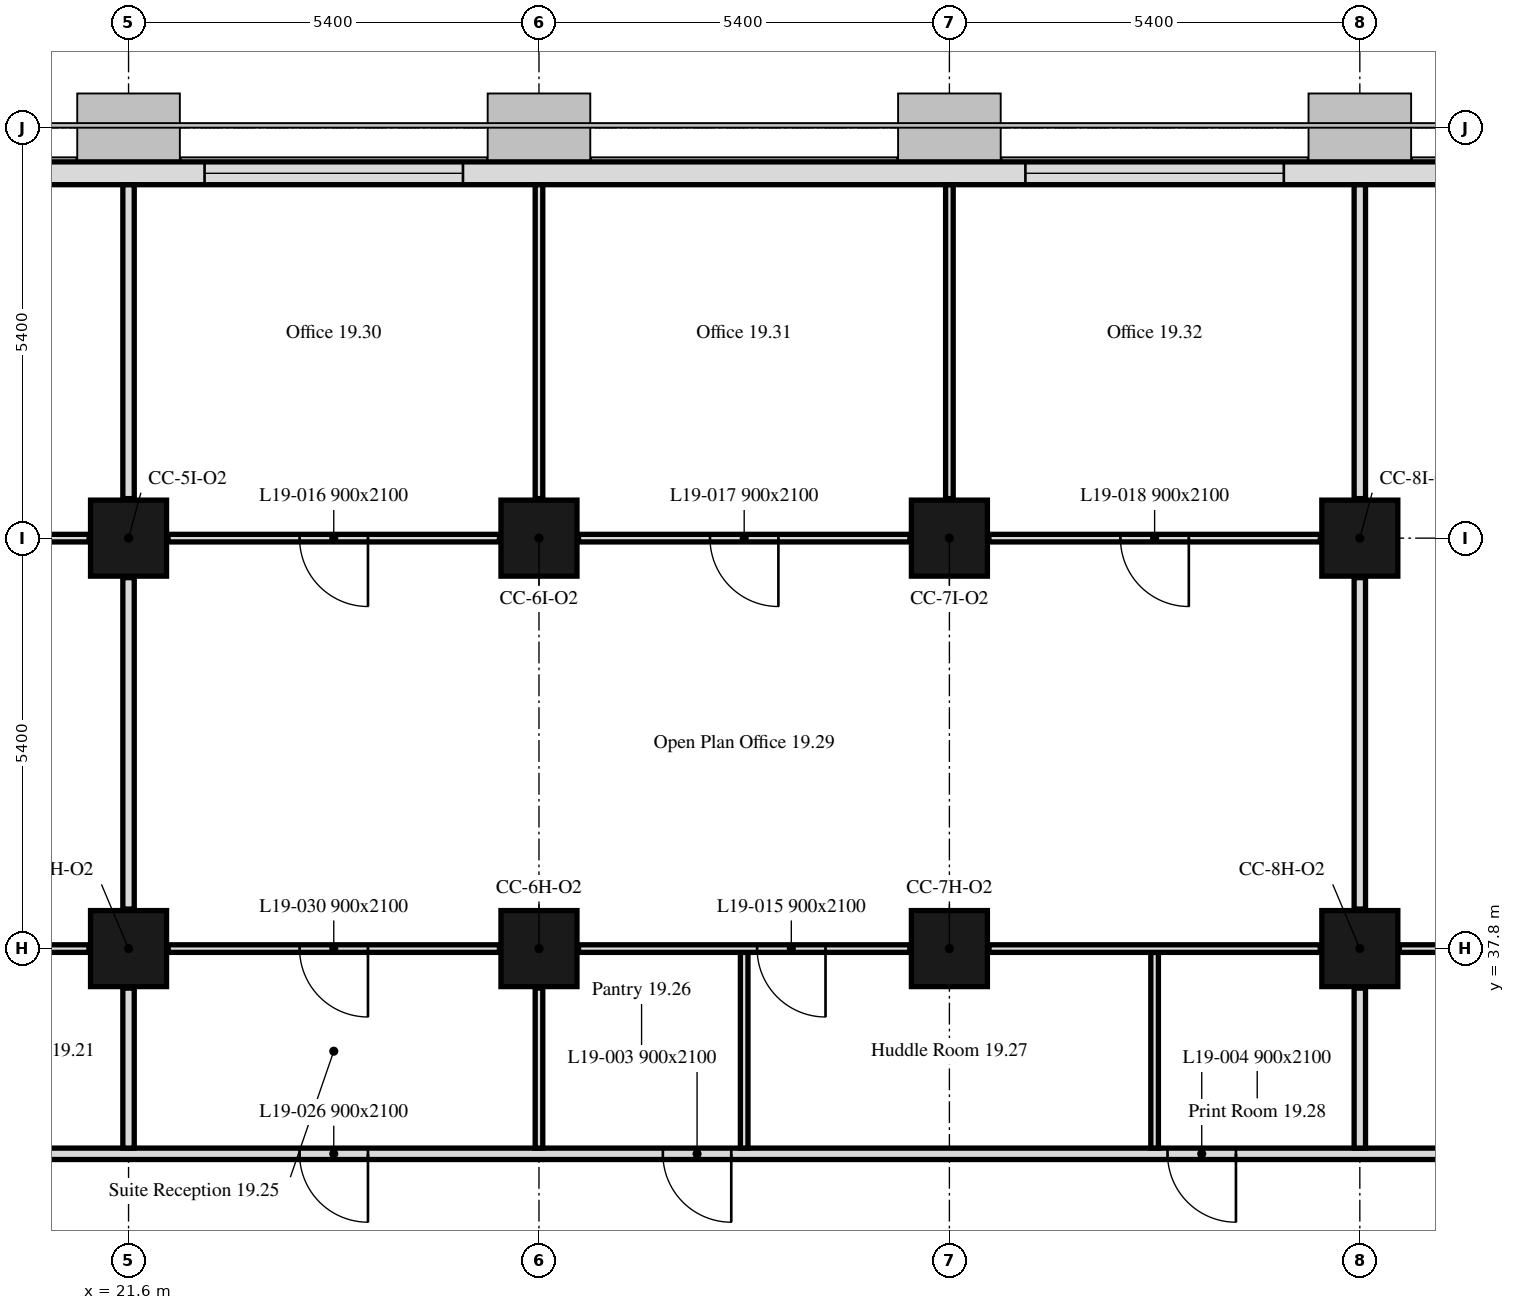
"""IFC4 building model, lengths in metres.
Left out: names, types, materials, properties, quantities, classifications, styles, units other than length and angle.
Written with IfcOpenShell. Run it as: python <this file> out.ifc"""

import sys

from ifc_helpers import new_model, si_unit, direction, frame, frame_2d, origin, origin_2d, place, context, subcontext, project, spatial, rectangle, extrude, element, fill, save


model = new_model("IFC4")
c1 = context("Model", 3, precision=1e-05, world=origin(), true_north=direction((0.0, 1.0)))
c2 = subcontext(c1, "Body", "Model", "MODEL_VIEW")
j1 = project(units=[si_unit("LENGTHUNIT", "METRE"), si_unit("PLANEANGLEUNIT", "RADIAN")], contexts=[c1])
p1 = place(None, origin())
s1 = spatial("IfcSite", under=j1, at=p1, CompositionType="ELEMENT")
p2 = place(p1, origin())
s2 = spatial("IfcBuilding", under=s1, at=p2, CompositionType="ELEMENT")
p3 = place(p2, frame((0.0, 0.0, 84.0)))
s3 = spatial("IfcBuildingStorey", under=s2, at=p3, CompositionType="ELEMENT", Elevation=84.0)
for number, where, z_axis, x_axis in (
    (1, (21.6, 37.8, 0.0), (0.0, 0.0, 1.0), (1.0, 0.0, 0.0)),
    (2, (27.0, 37.8, 0.0), (0.0, 0.0, 1.0), (1.0, 0.0, 0.0)),
    (3, (32.4, 37.8, 0.0), (0.0, 0.0, 1.0), (1.0, 0.0, 0.0)),
    (4, (37.8, 37.8, 0.0), (0.0, 0.0, 1.0), (1.0, 0.0, 0.0)),
    (5, (21.6, 43.2, 0.0), (0.0, 0.0, 1.0), (1.0, 0.0, 0.0)),
    (6, (27.0, 43.2, 0.0), (0.0, 0.0, 1.0), (1.0, 0.0, 0.0)),
    (7, (32.4, 43.2, 0.0), (0.0, 0.0, 1.0), (1.0, 0.0, 0.0)),
    (8, (37.8, 43.2, 0.0), (0.0, 0.0, 1.0), (1.0, 0.0, 0.0)),
):
    element("IfcColumn", number, at=place(p3, frame(where, z_axis=z_axis, x_axis=x_axis)), inside=s3, PredefinedType="COLUMN", context=c2, shape_type="SweptSolid", body=[
        extrude(rectangle(XDim=1.0, YDim=1.0, at=origin_2d()), origin(), (0.0, 0.0, 1.0), 3.5),
    ])
p4 = place(p3, frame((43.014, 48.0, 0.0), z_axis=(0.0, 0.0, 1.0), x_axis=(-1.0, 0.0, 0.0)))
e9 = element("IfcWall", 9, at=p4, inside=s3, PredefinedType="SOLIDWALL", context=c2, shape_type="SweptSolid", body=[
    extrude(rectangle(XDim=32.027, YDim=0.3, at=frame_2d((16.014, 0.0))), origin(), (0.0, 0.0, 1.0), 3.5),
])
p5 = place(p4, frame((6.214, 0.0, 0.9)))
e10 = element("IfcOpeningElement", 10, at=p5, cuts=e9, PredefinedType="OPENING", context=c2, shape_type="SweptSolid", body=[
    extrude(rectangle(XDim=3.4, YDim=1.7, at=frame_2d((1.7, 0.85))), frame((0.0, 0.16, 0.0), z_axis=(0.0, -1.0, 0.0), x_axis=(1.0, 0.0, 0.0)), (0.0, 0.0, 1.0), 0.32),
])
p6 = place(p4, frame((17.014, 0.0, 0.9)))
e11 = element("IfcOpeningElement", 11, at=p6, cuts=e9, PredefinedType="OPENING", context=c2, shape_type="SweptSolid", body=[
    extrude(rectangle(XDim=3.4, YDim=1.7, at=frame_2d((1.7, 0.85))), frame((0.0, 0.16, 0.0), z_axis=(0.0, -1.0, 0.0), x_axis=(1.0, 0.0, 0.0)), (0.0, 0.0, 1.0), 0.32),
])
p7 = place(p4, frame((27.814, 0.0, 0.9)))
e12 = element("IfcOpeningElement", 12, at=p7, cuts=e9, PredefinedType="OPENING", context=c2, shape_type="SweptSolid", body=[
    extrude(rectangle(XDim=3.4, YDim=1.7, at=frame_2d((1.7, 0.85))), frame((0.0, 0.16, 0.0), z_axis=(0.0, -1.0, 0.0), x_axis=(1.0, 0.0, 0.0)), (0.0, 0.0, 1.0), 0.32),
])
p8 = place(p3, frame((47.849, 35.1, 0.0), z_axis=(0.0, 0.0, 1.0), x_axis=(-1.0, 0.0, 0.0)))
e13 = element("IfcWall", 13, at=p8, inside=s3, PredefinedType="PARTITIONING", context=c2, shape_type="SweptSolid", body=[
    extrude(rectangle(XDim=41.698, YDim=0.15, at=frame_2d((20.849, 0.0))), origin(), (0.0, 0.0, 1.0), 2.75),
])
p9 = place(p8, frame((29.119, 0.0, 0.0)))
e14 = element("IfcOpeningElement", 14, at=p9, cuts=e13, PredefinedType="OPENING", context=c2, shape_type="SweptSolid", body=[
    extrude(rectangle(XDim=0.9, YDim=2.1, at=frame_2d((0.45, 1.05))), frame((0.0, 0.075, 0.0), z_axis=(0.0, -1.0, 0.0), x_axis=(1.0, 0.0, 0.0)), (0.0, 0.0, 1.0), 0.15),
])
p10 = place(p8, frame((27.879, 0.0, 0.0)))
e15 = element("IfcOpeningElement", 15, at=p10, cuts=e13, PredefinedType="OPENING", context=c2, shape_type="SweptSolid", body=[
    extrude(rectangle(XDim=0.9, YDim=2.1, at=frame_2d((0.45, 1.05))), frame((0.0, 0.075, 0.0), z_axis=(0.0, -1.0, 0.0), x_axis=(1.0, 0.0, 0.0)), (0.0, 0.0, 1.0), 0.15),
])
p11 = place(p8, frame((18.319, 0.0, 0.0)))
e16 = element("IfcOpeningElement", 16, at=p11, cuts=e13, PredefinedType="OPENING", context=c2, shape_type="SweptSolid", body=[
    extrude(rectangle(XDim=0.9, YDim=2.1, at=frame_2d((0.45, 1.05))), frame((0.0, 0.075, 0.0), z_axis=(0.0, -1.0, 0.0), x_axis=(1.0, 0.0, 0.0)), (0.0, 0.0, 1.0), 0.15),
])
p12 = place(p8, frame((11.679, 0.0, 0.0)))
e17 = element("IfcOpeningElement", 17, at=p12, cuts=e13, PredefinedType="OPENING", context=c2, shape_type="SweptSolid", body=[
    extrude(rectangle(XDim=0.9, YDim=2.1, at=frame_2d((0.45, 1.05))), frame((0.0, 0.075, 0.0), z_axis=(0.0, -1.0, 0.0), x_axis=(1.0, 0.0, 0.0)), (0.0, 0.0, 1.0), 0.15),
])
p13 = place(p8, frame((38.624, 0.0, 0.0)))
e18 = element("IfcOpeningElement", 18, at=p13, cuts=e13, PredefinedType="OPENING", context=c2, shape_type="SweptSolid", body=[
    extrude(rectangle(XDim=0.9, YDim=2.1, at=frame_2d((0.45, 1.05))), frame((0.0, 0.075, 0.0), z_axis=(0.0, -1.0, 0.0), x_axis=(1.0, 0.0, 0.0)), (0.0, 0.0, 1.0), 0.15),
])
p14 = place(p8, frame((23.099, 0.0, 0.0)))
e19 = element("IfcOpeningElement", 19, at=p14, cuts=e13, PredefinedType="OPENING", context=c2, shape_type="SweptSolid", body=[
    extrude(rectangle(XDim=0.9, YDim=2.1, at=frame_2d((0.45, 1.05))), frame((0.0, 0.075, 0.0), z_axis=(0.0, -1.0, 0.0), x_axis=(1.0, 0.0, 0.0)), (0.0, 0.0, 1.0), 0.15),
])
p15 = place(p8, frame((6.899, 0.0, 0.0)))
e20 = element("IfcOpeningElement", 20, at=p15, cuts=e13, PredefinedType="OPENING", context=c2, shape_type="SweptSolid", body=[
    extrude(rectangle(XDim=0.9, YDim=2.1, at=frame_2d((0.45, 1.05))), frame((0.0, 0.075, 0.0), z_axis=(0.0, -1.0, 0.0), x_axis=(1.0, 0.0, 0.0)), (0.0, 0.0, 1.0), 0.15),
])
p16 = place(p3, frame((21.6, 35.175, 0.0), z_axis=(0.0, 0.0, 1.0), x_axis=(0.0, 1.0, 0.0)))
e21 = element("IfcWall", 21, at=p16, inside=s3, PredefinedType="PARTITIONING", context=c2, shape_type="SweptSolid", body=[
    extrude(rectangle(XDim=2.105, YDim=0.15, at=frame_2d((1.052, 0.0))), origin(), (0.0, 0.0, 1.0), 2.75),
])
p17 = place(p3, frame((21.08, 37.8, 0.0), z_axis=(0.0, 0.0, 1.0), x_axis=(-1.0, 0.0, 0.0)))
e22 = element("IfcWall", 22, at=p17, inside=s3, PredefinedType="PARTITIONING", context=c2, shape_type="SweptSolid", body=[
    extrude(rectangle(XDim=4.36, YDim=0.1, at=frame_2d((2.18, 0.0))), origin(), (0.0, 0.0, 1.0), 3.5),
])
p18 = place(p3, frame((21.08, 43.2, 0.0), z_axis=(0.0, 0.0, 1.0), x_axis=(-1.0, 0.0, 0.0)))
e23 = element("IfcWall", 23, at=p18, inside=s3, PredefinedType="PARTITIONING", context=c2, shape_type="SweptSolid", body=[
    extrude(rectangle(XDim=4.36, YDim=0.1, at=frame_2d((2.18, 0.0))), origin(), (0.0, 0.0, 1.0), 3.5),
])
p19 = place(p18, frame((1.73, 0.0, 0.0)))
e24 = element("IfcOpeningElement", 24, at=p19, cuts=e23, PredefinedType="OPENING", context=c2, shape_type="SweptSolid", body=[
    extrude(rectangle(XDim=0.9, YDim=2.1, at=frame_2d((0.45, 1.05))), frame((0.0, 0.05, 0.0), z_axis=(0.0, -1.0, 0.0), x_axis=(1.0, 0.0, 0.0)), (0.0, 0.0, 1.0), 0.1),
])
p20 = place(p3, frame((21.6, 38.32, 0.0), z_axis=(0.0, 0.0, 1.0), x_axis=(0.0, 1.0, 0.0)))
e25 = element("IfcWall", 25, at=p20, inside=s3, PredefinedType="PARTITIONING", context=c2, shape_type="SweptSolid", body=[
    extrude(rectangle(XDim=4.36, YDim=0.15, at=frame_2d((2.18, 0.0))), origin(), (0.0, 0.0, 1.0), 2.75),
])
p21 = place(p3, frame((21.6, 43.72, 0.0), z_axis=(0.0, 0.0, 1.0), x_axis=(0.0, 1.0, 0.0)))
e26 = element("IfcWall", 26, at=p21, inside=s3, PredefinedType="PARTITIONING", context=c2, shape_type="SweptSolid", body=[
    extrude(rectangle(XDim=4.129, YDim=0.15, at=frame_2d((2.064, 0.0))), origin(), (0.0, 0.0, 1.0), 2.75),
])
p22 = place(p3, frame((27.0, 35.175, 0.0), z_axis=(0.0, 0.0, 1.0), x_axis=(0.0, 1.0, 0.0)))
e27 = element("IfcWall", 27, at=p22, inside=s3, PredefinedType="PARTITIONING", context=c2, shape_type="SweptSolid", body=[
    extrude(rectangle(XDim=2.105, YDim=0.1, at=frame_2d((1.052, 0.0))), origin(), (0.0, 0.0, 1.0), 2.75),
])
p23 = place(p3, frame((26.48, 37.8, 0.0), z_axis=(0.0, 0.0, 1.0), x_axis=(-1.0, 0.0, 0.0)))
e28 = element("IfcWall", 28, at=p23, inside=s3, PredefinedType="PARTITIONING", context=c2, shape_type="SweptSolid", body=[
    extrude(rectangle(XDim=4.36, YDim=0.1, at=frame_2d((2.18, 0.0))), origin(), (0.0, 0.0, 1.0), 3.5),
])
p24 = place(p23, frame((1.73, 0.0, 0.0)))
e29 = element("IfcOpeningElement", 29, at=p24, cuts=e28, PredefinedType="OPENING", context=c2, shape_type="SweptSolid", body=[
    extrude(rectangle(XDim=0.9, YDim=2.1, at=frame_2d((0.45, 1.05))), frame((0.0, 0.05, 0.0), z_axis=(0.0, -1.0, 0.0), x_axis=(1.0, 0.0, 0.0)), (0.0, 0.0, 1.0), 0.1),
])
for number, where, z_axis, x_axis in (
    (30, (29.7, 35.175, 0.0), (0.0, 0.0, 1.0), (0.0, 1.0, 0.0)),
    (31, (35.1, 35.175, 0.0), (0.0, 0.0, 1.0), (0.0, 1.0, 0.0)),
):
    element("IfcWall", number, at=place(p3, frame(where, z_axis=z_axis, x_axis=x_axis)), inside=s3, PredefinedType="PARTITIONING", context=c2, shape_type="SweptSolid", body=[
        extrude(rectangle(XDim=2.575, YDim=0.1, at=frame_2d((1.288, 0.0))), origin(), (0.0, 0.0, 1.0), 3.5),
    ])
p25 = place(p3, frame((31.88, 37.8, 0.0), z_axis=(0.0, 0.0, 1.0), x_axis=(-1.0, 0.0, 0.0)))
e32 = element("IfcWall", 32, at=p25, inside=s3, PredefinedType="PARTITIONING", context=c2, shape_type="SweptSolid", body=[
    extrude(rectangle(XDim=4.36, YDim=0.1, at=frame_2d((2.18, 0.0))), origin(), (0.0, 0.0, 1.0), 3.5),
])
p26 = place(p25, frame((1.11, 0.0, 0.0)))
e33 = element("IfcOpeningElement", 33, at=p26, cuts=e32, PredefinedType="OPENING", context=c2, shape_type="SweptSolid", body=[
    extrude(rectangle(XDim=0.9, YDim=2.1, at=frame_2d((0.45, 1.05))), frame((0.0, 0.05, 0.0), z_axis=(0.0, -1.0, 0.0), x_axis=(1.0, 0.0, 0.0)), (0.0, 0.0, 1.0), 0.1),
])
p27 = place(p3, frame((37.8, 35.175, 0.0), z_axis=(0.0, 0.0, 1.0), x_axis=(0.0, 1.0, 0.0)))
e34 = element("IfcWall", 34, at=p27, inside=s3, PredefinedType="PARTITIONING", context=c2, shape_type="SweptSolid", body=[
    extrude(rectangle(XDim=2.105, YDim=0.15, at=frame_2d((1.052, 0.0))), origin(), (0.0, 0.0, 1.0), 2.75),
])
p28 = place(p3, frame((37.28, 37.8, 0.0), z_axis=(0.0, 0.0, 1.0), x_axis=(-1.0, 0.0, 0.0)))
e35 = element("IfcWall", 35, at=p28, inside=s3, PredefinedType="PARTITIONING", context=c2, shape_type="SweptSolid", body=[
    extrude(rectangle(XDim=4.36, YDim=0.1, at=frame_2d((2.18, 0.0))), origin(), (0.0, 0.0, 1.0), 2.75),
])
p29 = place(p3, frame((37.8, 38.32, 0.0), z_axis=(0.0, 0.0, 1.0), x_axis=(0.0, 1.0, 0.0)))
e36 = element("IfcWall", 36, at=p29, inside=s3, PredefinedType="PARTITIONING", context=c2, shape_type="SweptSolid", body=[
    extrude(rectangle(XDim=4.36, YDim=0.15, at=frame_2d((2.18, 0.0))), origin(), (0.0, 0.0, 1.0), 2.75),
])
p30 = place(p3, frame((37.28, 43.2, 0.0), z_axis=(0.0, 0.0, 1.0), x_axis=(-1.0, 0.0, 0.0)))
e37 = element("IfcWall", 37, at=p30, inside=s3, PredefinedType="PARTITIONING", context=c2, shape_type="SweptSolid", body=[
    extrude(rectangle(XDim=4.36, YDim=0.1, at=frame_2d((2.18, 0.0))), origin(), (0.0, 0.0, 1.0), 3.5),
])
p31 = place(p30, frame((1.73, 0.0, 0.0)))
e38 = element("IfcOpeningElement", 38, at=p31, cuts=e37, PredefinedType="OPENING", context=c2, shape_type="SweptSolid", body=[
    extrude(rectangle(XDim=0.9, YDim=2.1, at=frame_2d((0.45, 1.05))), frame((0.0, 0.05, 0.0), z_axis=(0.0, -1.0, 0.0), x_axis=(1.0, 0.0, 0.0)), (0.0, 0.0, 1.0), 0.1),
])
p32 = place(p3, frame((31.88, 43.2, 0.0), z_axis=(0.0, 0.0, 1.0), x_axis=(-1.0, 0.0, 0.0)))
e39 = element("IfcWall", 39, at=p32, inside=s3, PredefinedType="PARTITIONING", context=c2, shape_type="SweptSolid", body=[
    extrude(rectangle(XDim=4.36, YDim=0.1, at=frame_2d((2.18, 0.0))), origin(), (0.0, 0.0, 1.0), 3.5),
])
p33 = place(p32, frame((1.73, 0.0, 0.0)))
e40 = element("IfcOpeningElement", 40, at=p33, cuts=e39, PredefinedType="OPENING", context=c2, shape_type="SweptSolid", body=[
    extrude(rectangle(XDim=0.9, YDim=2.1, at=frame_2d((0.45, 1.05))), frame((0.0, 0.05, 0.0), z_axis=(0.0, -1.0, 0.0), x_axis=(1.0, 0.0, 0.0)), (0.0, 0.0, 1.0), 0.1),
])
p34 = place(p3, frame((26.48, 43.2, 0.0), z_axis=(0.0, 0.0, 1.0), x_axis=(-1.0, 0.0, 0.0)))
e41 = element("IfcWall", 41, at=p34, inside=s3, PredefinedType="PARTITIONING", context=c2, shape_type="SweptSolid", body=[
    extrude(rectangle(XDim=4.36, YDim=0.1, at=frame_2d((2.18, 0.0))), origin(), (0.0, 0.0, 1.0), 3.5),
])
p35 = place(p34, frame((1.73, 0.0, 0.0)))
e42 = element("IfcOpeningElement", 42, at=p35, cuts=e41, PredefinedType="OPENING", context=c2, shape_type="SweptSolid", body=[
    extrude(rectangle(XDim=0.9, YDim=2.1, at=frame_2d((0.45, 1.05))), frame((0.0, 0.05, 0.0), z_axis=(0.0, -1.0, 0.0), x_axis=(1.0, 0.0, 0.0)), (0.0, 0.0, 1.0), 0.1),
])
for number, where, z_axis, x_axis in (
    (43, (27.0, 43.72, 0.0), (0.0, 0.0, 1.0), (0.0, 1.0, 0.0)),
    (44, (32.4, 43.72, 0.0), (0.0, 0.0, 1.0), (0.0, 1.0, 0.0)),
):
    element("IfcWall", number, at=place(p3, frame(where, z_axis=z_axis, x_axis=x_axis)), inside=s3, PredefinedType="PARTITIONING", context=c2, shape_type="SweptSolid", body=[
        extrude(rectangle(XDim=4.129, YDim=0.1, at=frame_2d((2.064, 0.0))), origin(), (0.0, 0.0, 1.0), 2.75),
    ])
p36 = place(p3, frame((37.8, 43.72, 0.0), z_axis=(0.0, 0.0, 1.0), x_axis=(0.0, 1.0, 0.0)))
e45 = element("IfcWall", 45, at=p36, inside=s3, PredefinedType="PARTITIONING", context=c2, shape_type="SweptSolid", body=[
    extrude(rectangle(XDim=4.129, YDim=0.15, at=frame_2d((2.064, 0.0))), origin(), (0.0, 0.0, 1.0), 2.75),
])
p37 = place(p3, frame((42.68, 37.8, 0.0), z_axis=(0.0, 0.0, 1.0), x_axis=(-1.0, 0.0, 0.0)))
e46 = element("IfcWall", 46, at=p37, inside=s3, PredefinedType="PARTITIONING", context=c2, shape_type="SweptSolid", body=[
    extrude(rectangle(XDim=4.36, YDim=0.1, at=frame_2d((2.18, 0.0))), origin(), (0.0, 0.0, 1.0), 2.75),
])
p38 = place(p37, frame((1.73, 0.0, 0.0)))
e47 = element("IfcOpeningElement", 47, at=p38, cuts=e46, PredefinedType="OPENING", context=c2, shape_type="SweptSolid", body=[
    extrude(rectangle(XDim=0.9, YDim=2.1, at=frame_2d((0.45, 1.05))), frame((0.0, 0.05, 0.0), z_axis=(0.0, -1.0, 0.0), x_axis=(1.0, 0.0, 0.0)), (0.0, 0.0, 1.0), 0.1),
])
p39 = place(p5, origin())
e48 = element("IfcWindow", 48, at=p39, inside=s3, PartitioningType="SINGLE_PANEL", PredefinedType="WINDOW", context=c2, shape_type="SweptSolid", body=[
    extrude(rectangle(XDim=3.4, YDim=1.7, at=frame_2d((1.7, 0.85))), frame((0.0, 0.03, 0.0), z_axis=(0.0, -1.0, 0.0), x_axis=(1.0, 0.0, 0.0)), (0.0, 0.0, 1.0), 0.06),
])
fill(e10, e48)
p40 = place(p6, origin())
e49 = element("IfcWindow", 49, at=p40, inside=s3, PartitioningType="SINGLE_PANEL", PredefinedType="WINDOW", context=c2, shape_type="SweptSolid", body=[
    extrude(rectangle(XDim=3.4, YDim=1.7, at=frame_2d((1.7, 0.85))), frame((0.0, 0.03, 0.0), z_axis=(0.0, -1.0, 0.0), x_axis=(1.0, 0.0, 0.0)), (0.0, 0.0, 1.0), 0.06),
])
fill(e11, e49)
p41 = place(p11, origin())
e50 = element("IfcDoor", 50, at=p41, inside=s3, OperationType="SINGLE_SWING_RIGHT", PredefinedType="DOOR", context=c2, shape_type="SweptSolid", body=[
    extrude(rectangle(XDim=0.9, YDim=2.1, at=frame_2d((0.45, 1.05))), frame((0.0, 0.025, 0.0), z_axis=(0.0, -1.0, 0.0), x_axis=(1.0, 0.0, 0.0)), (0.0, 0.0, 1.0), 0.05),
])
fill(e16, e50)
p42 = place(p12, origin())
e51 = element("IfcDoor", 51, at=p42, inside=s3, OperationType="SINGLE_SWING_RIGHT", PredefinedType="DOOR", context=c2, shape_type="SweptSolid", body=[
    extrude(rectangle(XDim=0.9, YDim=2.1, at=frame_2d((0.45, 1.05))), frame((0.0, 0.025, 0.0), z_axis=(0.0, -1.0, 0.0), x_axis=(1.0, 0.0, 0.0)), (0.0, 0.0, 1.0), 0.05),
])
fill(e17, e51)
p43 = place(p26, origin())
e52 = element("IfcDoor", 52, at=p43, inside=s3, OperationType="SINGLE_SWING_RIGHT", PredefinedType="DOOR", context=c2, shape_type="SweptSolid", body=[
    extrude(rectangle(XDim=0.9, YDim=2.1, at=frame_2d((0.45, 1.05))), frame((0.0, 0.025, 0.0), z_axis=(0.0, -1.0, 0.0), x_axis=(1.0, 0.0, 0.0)), (0.0, 0.0, 1.0), 0.05),
])
fill(e33, e52)
p44 = place(p35, origin())
e53 = element("IfcDoor", 53, at=p44, inside=s3, OperationType="SINGLE_SWING_RIGHT", PredefinedType="DOOR", context=c2, shape_type="SweptSolid", body=[
    extrude(rectangle(XDim=0.9, YDim=2.1, at=frame_2d((0.45, 1.05))), frame((0.0, 0.025, 0.0), z_axis=(0.0, -1.0, 0.0), x_axis=(1.0, 0.0, 0.0)), (0.0, 0.0, 1.0), 0.05),
])
fill(e42, e53)
p45 = place(p33, origin())
e54 = element("IfcDoor", 54, at=p45, inside=s3, OperationType="SINGLE_SWING_RIGHT", PredefinedType="DOOR", context=c2, shape_type="SweptSolid", body=[
    extrude(rectangle(XDim=0.9, YDim=2.1, at=frame_2d((0.45, 1.05))), frame((0.0, 0.025, 0.0), z_axis=(0.0, -1.0, 0.0), x_axis=(1.0, 0.0, 0.0)), (0.0, 0.0, 1.0), 0.05),
])
fill(e40, e54)
p46 = place(p31, origin())
e55 = element("IfcDoor", 55, at=p46, inside=s3, OperationType="SINGLE_SWING_RIGHT", PredefinedType="DOOR", context=c2, shape_type="SweptSolid", body=[
    extrude(rectangle(XDim=0.9, YDim=2.1, at=frame_2d((0.45, 1.05))), frame((0.0, 0.025, 0.0), z_axis=(0.0, -1.0, 0.0), x_axis=(1.0, 0.0, 0.0)), (0.0, 0.0, 1.0), 0.05),
])
fill(e38, e55)
p47 = place(p14, origin())
e56 = element("IfcDoor", 56, at=p47, inside=s3, OperationType="SINGLE_SWING_RIGHT", PredefinedType="DOOR", context=c2, shape_type="SweptSolid", body=[
    extrude(rectangle(XDim=0.9, YDim=2.1, at=frame_2d((0.45, 1.05))), frame((0.0, 0.025, 0.0), z_axis=(0.0, -1.0, 0.0), x_axis=(1.0, 0.0, 0.0)), (0.0, 0.0, 1.0), 0.05),
])
fill(e19, e56)
p48 = place(p24, origin())
e57 = element("IfcDoor", 57, at=p48, inside=s3, OperationType="SINGLE_SWING_LEFT", PredefinedType="DOOR", context=c2, shape_type="SweptSolid", body=[
    extrude(rectangle(XDim=0.9, YDim=2.1, at=frame_2d((0.45, 1.05))), frame((0.0, 0.025, 0.0), z_axis=(0.0, -1.0, 0.0), x_axis=(1.0, 0.0, 0.0)), (0.0, 0.0, 1.0), 0.05),
])
fill(e29, e57)
save(model, sys.argv[1])
